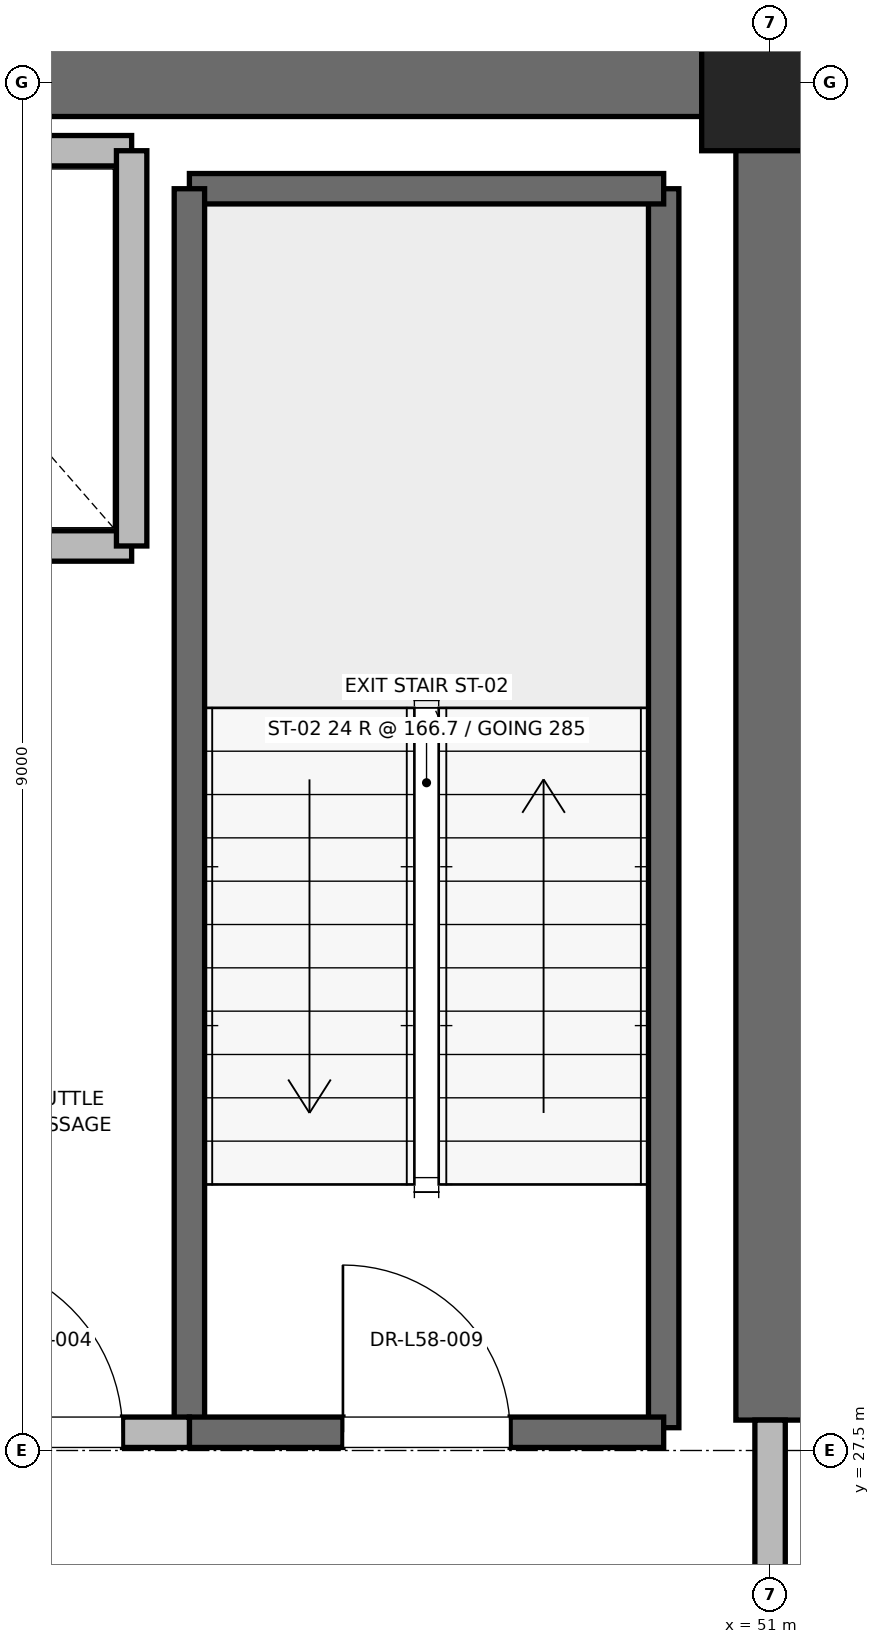
"""IFC4 building model, lengths in metres.
Left out: names, types, materials, properties, quantities, classifications, styles, units other than length and angle.
Written with IfcOpenShell. Run it as: python <this file> out.ifc"""

import sys

from ifc_helpers import new_model, si_unit, direction, frame, frame_2d, origin, origin_2d, place, context, subcontext, project, spatial, rectangle, extrude, element, fill, save


model = new_model("IFC4")
c1 = context("Model", 3, precision=1e-05, world=origin(), true_north=direction((0.0, 1.0)))
c2 = subcontext(c1, "Body", "Model", "MODEL_VIEW")
j1 = project(units=[si_unit("LENGTHUNIT", "METRE"), si_unit("PLANEANGLEUNIT", "RADIAN")], contexts=[c1])
p1 = place(None, origin())
s1 = spatial("IfcSite", under=j1, at=p1, CompositionType="ELEMENT")
p2 = place(p1, origin())
s2 = spatial("IfcBuilding", under=s1, at=p2, CompositionType="ELEMENT")
p3 = place(p2, frame((0.0, 0.0, 251.2)))
s3 = spatial("IfcBuildingStorey", under=s2, at=p3, CompositionType="ELEMENT", Elevation=251.2)
p4 = place(p3, frame((51.0, 36.5, 0.0), z_axis=(0.0, 0.0, 1.0), x_axis=(1.0, 0.0, 0.0)))
e1 = element("IfcColumn", 1, at=p4, inside=s3, PredefinedType="PILASTER", context=c2, shape_type="SweptSolid", body=[
    extrude(rectangle(XDim=0.9, YDim=0.9, at=origin_2d()), origin(), (0.0, 0.0, 1.0), 4.0),
])
p5 = place(p3, frame((45.2, 36.5, 0.0), z_axis=(0.0, 0.0, 1.0), x_axis=(1.0, 0.0, 0.0)))
e2 = element("IfcWall", 2, at=p5, inside=s3, PredefinedType="SHEAR", context=c2, shape_type="SweptSolid", body=[
    extrude(rectangle(XDim=5.8, YDim=0.45, at=frame_2d((2.9, 0.0))), origin(), (0.0, 0.0, 1.0), 3.785),
])
p6 = place(p3, frame((51.0, 27.7, 0.0), z_axis=(0.0, 0.0, 1.0), x_axis=(0.0, 1.0, 0.0)))
e3 = element("IfcWall", 3, at=p6, inside=s3, PredefinedType="SHEAR", context=c2, shape_type="SweptSolid", body=[
    extrude(rectangle(XDim=8.8, YDim=0.45, at=frame_2d((4.4, 0.0))), origin(), (0.0, 0.0, 1.0), 3.785),
])
p7 = place(p3, frame((50.3, 27.65, 0.0), z_axis=(0.0, 0.0, 1.0), x_axis=(0.0, 1.0, 0.0)))
e4 = element("IfcWall", 4, at=p7, inside=s3, PredefinedType="SOLIDWALL", context=c2, shape_type="SweptSolid", body=[
    extrude(rectangle(XDim=8.15, YDim=0.2, at=frame_2d((4.075, 0.0))), origin(), (0.0, 0.0, 1.0), 3.785),
])
p8 = place(p3, frame((47.18, 35.8, 0.0), z_axis=(0.0, 0.0, 1.0), x_axis=(1.0, 0.0, 0.0)))
e5 = element("IfcWall", 5, at=p8, inside=s3, PredefinedType="SOLIDWALL", context=c2, shape_type="SweptSolid", body=[
    extrude(rectangle(XDim=3.12, YDim=0.2, at=frame_2d((1.56, 0.0))), origin(), (0.0, 0.0, 1.0), 3.785),
])
p9 = place(p3, frame((47.18, 27.62, 0.0), z_axis=(0.0, 0.0, 1.0), x_axis=(0.0, 1.0, 0.0)))
e6 = element("IfcWall", 6, at=p9, inside=s3, PredefinedType="SOLIDWALL", context=c2, shape_type="SweptSolid", body=[
    extrude(rectangle(XDim=8.18, YDim=0.2, at=frame_2d((4.09, 0.0))), origin(), (0.0, 0.0, 1.0), 3.785),
])
p10 = place(p3, frame((47.18, 27.62, 0.0), z_axis=(0.0, 0.0, 1.0), x_axis=(1.0, 0.0, 0.0)))
e7 = element("IfcWall", 7, at=p10, inside=s3, PredefinedType="SOLIDWALL", context=c2, shape_type="SweptSolid", body=[
    extrude(rectangle(XDim=3.12, YDim=0.2, at=frame_2d((1.56, 0.0))), origin(), (0.0, 0.0, 1.0), 3.785),
])
p11 = place(p10, frame((1.01, 0.0, 0.0)))
e8 = element("IfcOpeningElement", 8, at=p11, cuts=e7, PredefinedType="OPENING", context=c2, shape_type="SweptSolid", body=[
    extrude(rectangle(XDim=1.1, YDim=2.15, at=frame_2d((0.55, 1.075))), frame((0.0, 0.1, 0.0), z_axis=(0.0, -1.0, 0.0), x_axis=(1.0, 0.0, 0.0)), (0.0, 0.0, 1.0), 0.2),
])
p12 = place(p3, frame((45.15, 27.62, 0.0), z_axis=(0.0, 0.0, 1.0), x_axis=(1.0, 0.0, 0.0)))
e9 = element("IfcWall", 9, at=p12, inside=s3, PredefinedType="PARTITIONING", context=c2, shape_type="SweptSolid", body=[
    extrude(rectangle(XDim=2.03, YDim=0.2, at=frame_2d((1.015, 0.0))), origin(), (0.0, 0.0, 1.0), 3.785),
])
p13 = place(p12, frame((0.44, 0.0, 0.0)))
e10 = element("IfcOpeningElement", 10, at=p13, cuts=e9, PredefinedType="OPENING", context=c2, shape_type="SweptSolid", body=[
    extrude(rectangle(XDim=1.15, YDim=2.2, at=frame_2d((0.575, 1.1))), frame((0.0, 0.1, 0.0), z_axis=(0.0, -1.0, 0.0), x_axis=(1.0, 0.0, 0.0)), (0.0, 0.0, 1.0), 0.2),
])
p14 = place(p3, frame((51.0, 24.3, 0.0), z_axis=(0.0, 0.0, 1.0), x_axis=(0.0, 1.0, 0.0)))
e11 = element("IfcWall", 11, at=p14, inside=s3, PredefinedType="PARTITIONING", context=c2, shape_type="SweptSolid", body=[
    extrude(rectangle(XDim=3.4, YDim=0.2, at=frame_2d((1.7, 0.0))), origin(), (0.0, 0.0, 1.0), 2.865),
])
p15 = place(p14, frame((1.125, 0.0, 0.0)))
e12 = element("IfcOpeningElement", 12, at=p15, cuts=e11, PredefinedType="OPENING", context=c2, shape_type="SweptSolid", body=[
    extrude(rectangle(XDim=1.15, YDim=2.2, at=frame_2d((0.575, 1.1))), frame((0.0, 0.1, 0.0), z_axis=(0.0, -1.0, 0.0), x_axis=(1.0, 0.0, 0.0)), (0.0, 0.0, 1.0), 0.2),
])
p16 = place(p3, frame((44.5, 33.45, 0.0), z_axis=(0.0, 0.0, 1.0), x_axis=(1.0, 0.0, 0.0)))
e13 = element("IfcWall", 13, at=p16, inside=s3, PredefinedType="SOLIDWALL", context=c2, shape_type="SweptSolid", body=[
    extrude(rectangle(XDim=2.3, YDim=0.2, at=frame_2d((1.15, 0.0))), origin(), (0.0, 0.0, 1.0), 3.785),
])
p17 = place(p3, frame((46.8, 36.05, 0.0), z_axis=(0.0, 0.0, 1.0), x_axis=(-1.0, 0.0, 0.0)))
e14 = element("IfcWall", 14, at=p17, inside=s3, PredefinedType="SOLIDWALL", context=c2, shape_type="SweptSolid", body=[
    extrude(rectangle(XDim=2.3, YDim=0.2, at=frame_2d((1.15, 0.0))), origin(), (0.0, 0.0, 1.0), 2.865),
])
p18 = place(p3, frame((46.8, 33.45, 0.0), z_axis=(0.0, 0.0, 1.0), x_axis=(0.0, 1.0, 0.0)))
e15 = element("IfcWall", 15, at=p18, inside=s3, PredefinedType="SOLIDWALL", context=c2, shape_type="SweptSolid", body=[
    extrude(rectangle(XDim=2.6, YDim=0.2, at=frame_2d((1.3, 0.0))), origin(), (0.0, 0.0, 1.0), 3.785),
])
p19 = place(p11, origin())
e16 = element("IfcDoor", 16, at=p19, inside=s3, OperationType="SINGLE_SWING_LEFT", PredefinedType="DOOR", context=c2, shape_type="SweptSolid", body=[
    extrude(rectangle(XDim=1.1, YDim=2.15, at=frame_2d((0.55, 1.075))), frame((0.0, 0.025, 0.0), z_axis=(0.0, -1.0, 0.0), x_axis=(1.0, 0.0, 0.0)), (0.0, 0.0, 1.0), 0.05),
])
fill(e8, e16)
p20 = place(p13, origin())
e17 = element("IfcDoor", 17, at=p20, inside=s3, OperationType="SINGLE_SWING_LEFT", PredefinedType="DOOR", context=c2, shape_type="SweptSolid", body=[
    extrude(rectangle(XDim=1.15, YDim=2.2, at=frame_2d((0.575, 1.1))), frame((0.0, 0.025, 0.0), z_axis=(0.0, -1.0, 0.0), x_axis=(1.0, 0.0, 0.0)), (0.0, 0.0, 1.0), 0.05),
])
fill(e10, e17)
save(model, sys.argv[1])
